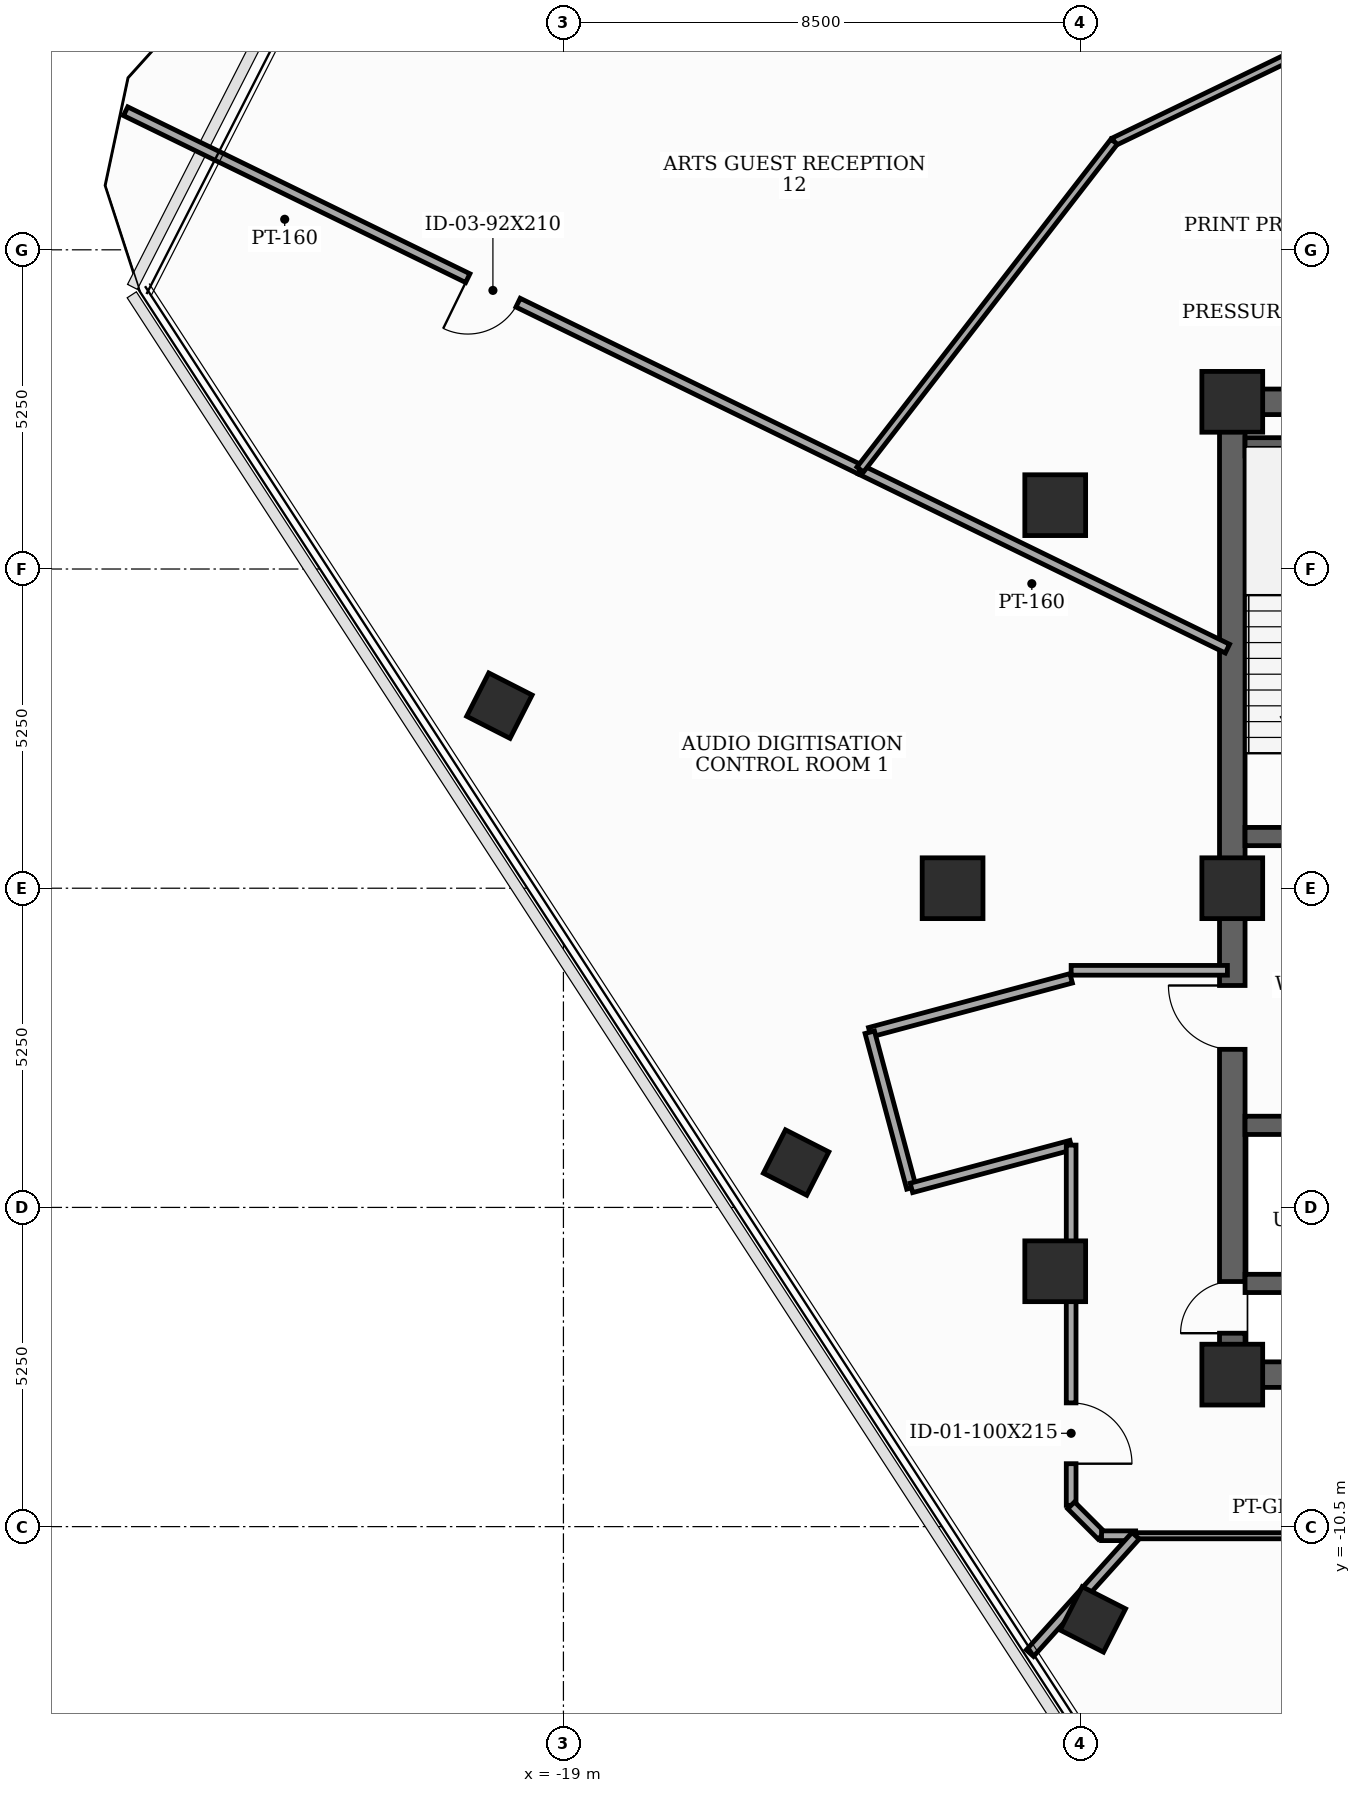
"""IFC4 building model, lengths in metres.
Left out: names, types, materials, properties, quantities, classifications, styles, units other than length and angle.
Written with IfcOpenShell. Run it as: python <this file> out.ifc"""

import sys

from ifc_helpers import new_model, si_unit, direction, frame, frame_2d, origin, origin_2d, place, context, subcontext, project, spatial, rectangle, extrude, element, fill, save


model = new_model("IFC4")
c1 = context("Model", 3, precision=1e-05, world=origin(), true_north=direction((0.0, 1.0)))
c2 = subcontext(c1, "Body", "Model", "MODEL_VIEW")
j1 = project(units=[si_unit("LENGTHUNIT", "METRE"), si_unit("PLANEANGLEUNIT", "RADIAN")], contexts=[c1])
p1 = place(None, origin())
s1 = spatial("IfcSite", under=j1, at=p1, CompositionType="ELEMENT")
p2 = place(p1, origin())
s2 = spatial("IfcBuilding", under=s1, at=p2, CompositionType="ELEMENT")
p3 = place(p2, frame((0.0, 0.0, 255.9)))
s3 = spatial("IfcBuildingStorey", under=s2, at=p3, CompositionType="ELEMENT", Elevation=255.9)
for number, where, z_axis, x_axis in (
    (1, (-8.0, -8.0, 0.0), (0.0, 0.0, 1.0), (1.0, 0.0, 0.0)),
    (2, (-8.0, 8.0, 0.0), (0.0, 0.0, 1.0), (1.0, 0.0, 0.0)),
    (3, (-8.0, 0.0, 0.0), (0.0, 0.0, 1.0), (1.0, 0.0, 0.0)),
    (4, (-10.912, 6.3, 0.0), (0.0, 0.0, 1.0), (1.0, 0.0, 0.0)),
    (5, (-12.6, 0.0, 0.0), (0.0, 0.0, 1.0), (1.0, 0.0, 0.0)),
    (6, (-10.912, -6.3, 0.0), (0.0, 0.0, 1.0), (1.0, 0.0, 0.0)),
):
    element("IfcColumn", number, at=place(p3, frame(where, z_axis=z_axis, x_axis=x_axis)), inside=s3, PredefinedType="COLUMN", context=c2, shape_type="SweptSolid", body=[
        extrude(rectangle(XDim=1.0, YDim=1.0, at=origin_2d()), origin(), (0.0, 0.0, 1.0), 3.7),
    ])
for number, where, z_axis, x_axis in (
    (7, (-20.053, 3.003, 0.0), (0.0, 0.0, 1.0), (0.454, 0.891, 0.0)),
    (8, (-15.173, -4.512, 0.0), (0.0, 0.0, 1.0), (0.454, 0.891, 0.0)),
    (9, (-10.293, -12.026, 0.0), (0.0, 0.0, 1.0), (0.454, 0.891, 0.0)),
):
    element("IfcColumn", number, at=place(p3, frame(where, z_axis=z_axis, x_axis=x_axis)), inside=s3, PredefinedType="COLUMN", context=c2, shape_type="SweptSolid", body=[
        extrude(rectangle(XDim=0.8, YDim=0.8, at=origin_2d()), origin(), (0.0, 0.0, 1.0), 3.7),
    ])
p4 = place(p3, frame((-8.0, -8.0, 0.0), z_axis=(0.0, 0.0, 1.0), x_axis=(0.0, 1.0, 0.0)))
e10 = element("IfcWall", 10, at=p4, inside=s3, PredefinedType="SHEAR", context=c2, shape_type="SweptSolid", body=[
    extrude(rectangle(XDim=16.0, YDim=0.42, at=frame_2d((8.0, 0.0))), origin(), (0.0, 0.0, 1.0), 3.5),
])
p5 = place(p4, frame((0.681, 0.0, 0.0)))
e11 = element("IfcOpeningElement", 11, at=p5, cuts=e10, PredefinedType="OPENING", context=c2, shape_type="SweptSolid", body=[
    extrude(rectangle(XDim=0.85, YDim=2.02, at=frame_2d((0.425, 1.01))), frame((0.0, 0.22, 0.0), z_axis=(0.0, -1.0, 0.0), x_axis=(1.0, 0.0, 0.0)), (0.0, 0.0, 1.0), 0.44),
])
p6 = place(p4, frame((5.35, 0.0, 0.0)))
e12 = element("IfcOpeningElement", 12, at=p6, cuts=e10, PredefinedType="OPENING", context=c2, shape_type="SweptSolid", body=[
    extrude(rectangle(XDim=1.05, YDim=2.15, at=frame_2d((0.525, 1.075))), frame((0.0, 0.22, 0.0), z_axis=(0.0, -1.0, 0.0), x_axis=(1.0, 0.0, 0.0)), (0.0, 0.0, 1.0), 0.44),
])
p7 = place(p3, frame((-8.0, -8.0, 0.0), z_axis=(0.0, 0.0, 1.0), x_axis=(1.0, 0.0, 0.0)))
e13 = element("IfcWall", 13, at=p7, inside=s3, PredefinedType="SHEAR", context=c2, shape_type="SweptSolid", body=[
    extrude(rectangle(XDim=16.0, YDim=0.42, at=frame_2d((8.0, 0.0))), origin(), (0.0, 0.0, 1.0), 3.5),
])
p8 = place(p7, frame((5.2, 0.0, 0.0)))
e14 = element("IfcOpeningElement", 14, at=p8, cuts=e13, PredefinedType="OPENING", context=c2, shape_type="SweptSolid", body=[
    extrude(rectangle(XDim=0.95, YDim=2.1, at=frame_2d((0.475, 1.05))), frame((0.0, 0.22, 0.0), z_axis=(0.0, -1.0, 0.0), x_axis=(1.0, 0.0, 0.0)), (0.0, 0.0, 1.0), 0.44),
])
p9 = place(p7, frame((9.8, 0.0, 0.0)))
e15 = element("IfcOpeningElement", 15, at=p9, cuts=e13, PredefinedType="OPENING", context=c2, shape_type="SweptSolid", body=[
    extrude(rectangle(XDim=0.95, YDim=2.1, at=frame_2d((0.475, 1.05))), frame((0.0, 0.22, 0.0), z_axis=(0.0, -1.0, 0.0), x_axis=(1.0, 0.0, 0.0)), (0.0, 0.0, 1.0), 0.44),
])
p10 = place(p3, frame((-8.0, 8.0, 0.0), z_axis=(0.0, 0.0, 1.0), x_axis=(1.0, 0.0, 0.0)))
e16 = element("IfcWall", 16, at=p10, inside=s3, PredefinedType="SHEAR", context=c2, shape_type="SweptSolid", body=[
    extrude(rectangle(XDim=16.0, YDim=0.42, at=frame_2d((8.0, 0.0))), origin(), (0.0, 0.0, 1.0), 3.5),
])
p11 = place(p10, frame((7.1, 0.0, 0.0)))
e17 = element("IfcOpeningElement", 17, at=p11, cuts=e16, PredefinedType="OPENING", context=c2, shape_type="SweptSolid", body=[
    extrude(rectangle(XDim=1.8, YDim=2.15, at=frame_2d((0.9, 1.075))), frame((0.0, 0.22, 0.0), z_axis=(0.0, -1.0, 0.0), x_axis=(1.0, 0.0, 0.0)), (0.0, 0.0, 1.0), 0.44),
])
p12 = place(p3, frame((-7.79, 0.85, 0.0), z_axis=(0.0, 0.0, 1.0), x_axis=(1.0, 0.0, 0.0)))
e18 = element("IfcWall", 18, at=p12, inside=s3, PredefinedType="SHEAR", context=c2, shape_type="SweptSolid", body=[
    extrude(rectangle(XDim=3.34, YDim=0.3, at=frame_2d((1.67, 0.0))), origin(), (0.0, 0.0, 1.0), 3.5),
])
p13 = place(p12, frame((1.85, 0.0, 0.0)))
e19 = element("IfcOpeningElement", 19, at=p13, cuts=e18, PredefinedType="OPENING", context=c2, shape_type="SweptSolid", body=[
    extrude(rectangle(XDim=1.05, YDim=2.15, at=frame_2d((0.525, 1.075))), frame((0.0, 0.16, 0.0), z_axis=(0.0, -1.0, 0.0), x_axis=(1.0, 0.0, 0.0)), (0.0, 0.0, 1.0), 0.32),
])
p14 = place(p3, frame((-7.79, 7.26, 0.0), z_axis=(0.0, 0.0, 1.0), x_axis=(1.0, 0.0, 0.0)))
e20 = element("IfcWall", 20, at=p14, inside=s3, PredefinedType="SHEAR", context=c2, shape_type="SweptSolid", body=[
    extrude(rectangle(XDim=3.34, YDim=0.3, at=frame_2d((1.67, 0.0))), origin(), (0.0, 0.0, 1.0), 3.5),
])
p15 = place(p3, frame((-7.79, -3.9, 0.0), z_axis=(0.0, 0.0, 1.0), x_axis=(1.0, 0.0, 0.0)))
e21 = element("IfcWall", 21, at=p15, inside=s3, PredefinedType="SHEAR", context=c2, shape_type="SweptSolid", body=[
    extrude(rectangle(XDim=3.34, YDim=0.3, at=frame_2d((1.67, 0.0))), origin(), (0.0, 0.0, 1.0), 3.5),
])
p16 = place(p15, frame((1.27, 0.0, 0.0)))
e22 = element("IfcOpeningElement", 22, at=p16, cuts=e21, PredefinedType="OPENING", context=c2, shape_type="SweptSolid", body=[
    extrude(rectangle(XDim=1.1, YDim=2.1, at=frame_2d((0.55, 1.05))), frame((0.0, 0.16, 0.0), z_axis=(0.0, -1.0, 0.0), x_axis=(1.0, 0.0, 0.0)), (0.0, 0.0, 1.0), 0.32),
])
p17 = place(p3, frame((-7.79, -6.5, 0.0), z_axis=(0.0, 0.0, 1.0), x_axis=(1.0, 0.0, 0.0)))
e23 = element("IfcWall", 23, at=p17, inside=s3, PredefinedType="SHEAR", context=c2, shape_type="SweptSolid", body=[
    extrude(rectangle(XDim=3.34, YDim=0.3, at=frame_2d((1.67, 0.0))), origin(), (0.0, 0.0, 1.0), 3.5),
])
p18 = place(p3, frame((-8.08, -1.35, 0.0), z_axis=(0.0, 0.0, 1.0), x_axis=(-1.0, 0.0, 0.0)))
e24 = element("IfcWall", 24, at=p18, inside=s3, PredefinedType="PARTITIONING", context=c2, shape_type="SweptSolid", body=[
    extrude(rectangle(XDim=2.57, YDim=0.16, at=frame_2d((1.285, 0.0))), origin(), (0.0, 0.0, 1.0), 2.885),
])
p19 = place(p3, frame((-10.65, -1.482, 0.0), z_axis=(0.0, 0.0, 1.0), x_axis=(-0.965961397105, -0.2586862565, 0.0)))
e25 = element("IfcWall", 25, at=p19, inside=s3, PredefinedType="PARTITIONING", context=c2, shape_type="SweptSolid", body=[
    extrude(rectangle(XDim=3.429, YDim=0.16, at=frame_2d((1.714, 0.0))), origin(), (0.0, 0.0, 1.0), 2.885),
])
p20 = place(p3, frame((-13.962, -2.369, 0.0), z_axis=(0.0, 0.0, 1.0), x_axis=(0.258413725385, -0.966034340245, 0.0)))
e26 = element("IfcWall", 26, at=p20, inside=s3, PredefinedType="PARTITIONING", context=c2, shape_type="SweptSolid", body=[
    extrude(rectangle(XDim=2.65, YDim=0.16, at=frame_2d((1.325, 0.0))), origin(), (0.0, 0.0, 1.0), 3.5),
])
p21 = place(p3, frame((-13.277, -4.929, 0.0), z_axis=(0.0, 0.0, 1.0), x_axis=(0.965934830229, 0.258785439601, 0.0)))
e27 = element("IfcWall", 27, at=p21, inside=s3, PredefinedType="PARTITIONING", context=c2, shape_type="SweptSolid", body=[
    extrude(rectangle(XDim=2.72, YDim=0.16, at=frame_2d((1.36, 0.0))), origin(), (0.0, 0.0, 1.0), 2.885),
])
p22 = place(p3, frame((-10.65, -4.225, 0.0), z_axis=(0.0, 0.0, 1.0), x_axis=(0.0, -1.0, 0.0)))
e28 = element("IfcWall", 28, at=p22, inside=s3, PredefinedType="PARTITIONING", context=c2, shape_type="SweptSolid", body=[
    extrude(rectangle(XDim=5.925, YDim=0.16, at=frame_2d((2.962, 0.0))), origin(), (0.0, 0.0, 1.0), 2.885),
])
p23 = place(p22, frame((4.24, 0.0, 0.0)))
e29 = element("IfcOpeningElement", 29, at=p23, cuts=e28, PredefinedType="OPENING", context=c2, shape_type="SweptSolid", body=[
    extrude(rectangle(XDim=1.0, YDim=2.15, at=frame_2d((0.5, 1.075))), frame((0.0, 0.09, 0.0), z_axis=(0.0, -1.0, 0.0), x_axis=(1.0, 0.0, 0.0)), (0.0, 0.0, 1.0), 0.18),
])
p24 = place(p3, frame((-10.65, -10.15, 0.0), z_axis=(0.0, 0.0, 1.0), x_axis=(0.707106781187, -0.707106781187, 0.0)))
e30 = element("IfcWall", 30, at=p24, inside=s3, PredefinedType="PARTITIONING", context=c2, shape_type="SweptSolid", body=[
    extrude(rectangle(XDim=0.707, YDim=0.16, at=frame_2d((0.354, 0.0))), origin(), (0.0, 0.0, 1.0), 3.5),
])
p25 = place(p3, frame((-10.15, -10.65, 0.0), z_axis=(0.0, 0.0, 1.0), x_axis=(1.0, 0.0, 0.0)))
e31 = element("IfcWall", 31, at=p25, inside=s3, PredefinedType="PARTITIONING", context=c2, shape_type="SweptSolid", body=[
    extrude(rectangle(XDim=0.561, YDim=0.16, at=frame_2d((0.28, 0.0))), origin(), (0.0, 0.0, 1.0), 3.5),
])
p26 = place(p3, frame((-9.589, -10.65, 0.0), z_axis=(0.0, 0.0, 1.0), x_axis=(1.0, 0.0, 0.0)))
e32 = element("IfcWall", 32, at=p26, inside=s3, PredefinedType="MOVABLE", context=c2, shape_type="SweptSolid", body=[
    extrude(rectangle(XDim=4.739, YDim=0.1, at=frame_2d((2.37, 0.0))), origin(), (0.0, 0.0, 1.0), 2.885),
])
p27 = place(p3, frame((-11.328, -12.581, 0.0), z_axis=(0.0, 0.0, 1.0), x_axis=(0.669120437161, 0.743153981739, 0.0)))
e33 = element("IfcWall", 33, at=p27, inside=s3, PredefinedType="PARTITIONING", context=c2, shape_type="SweptSolid", body=[
    extrude(rectangle(XDim=2.599, YDim=0.16, at=frame_2d((1.299, 0.0))), origin(), (0.0, 0.0, 1.0), 3.035),
])
p28 = place(p3, frame((-8.08, 3.941, 0.0), z_axis=(0.0, 0.0, 1.0), x_axis=(-0.898794985177, 0.438369221798, 0.0)))
e34 = element("IfcWall", 34, at=p28, inside=s3, PredefinedType="PARTITIONING", context=c2, shape_type="SweptSolid", body=[
    extrude(rectangle(XDim=6.719, YDim=0.16, at=frame_2d((3.359, 0.0))), origin(), (0.0, 0.0, 1.0), 2.885),
])
p29 = place(p3, frame((-14.119, 6.886, 0.0), z_axis=(0.0, 0.0, 1.0), x_axis=(-0.898768620199, 0.438423274184, 0.0)))
e35 = element("IfcWall", 35, at=p29, inside=s3, PredefinedType="PARTITIONING", context=c2, shape_type="SweptSolid", body=[
    extrude(rectangle(XDim=13.442, YDim=0.16, at=frame_2d((6.721, 0.0))), origin(), (0.0, 0.0, 1.0), 3.035),
])
p30 = place(p29, frame((6.261, 0.0, 0.0)))
e36 = element("IfcOpeningElement", 36, at=p30, cuts=e35, PredefinedType="OPENING", context=c2, shape_type="SweptSolid", body=[
    extrude(rectangle(XDim=0.92, YDim=2.1, at=frame_2d((0.46, 1.05))), frame((0.0, 0.09, 0.0), z_axis=(0.0, -1.0, 0.0), x_axis=(1.0, 0.0, 0.0)), (0.0, 0.0, 1.0), 0.18),
])
p31 = place(p3, frame((-3.8, 15.242, 0.0), z_axis=(0.0, 0.0, 1.0), x_axis=(-0.900708156853, -0.434424695635, 0.0)))
e37 = element("IfcWall", 37, at=p31, inside=s3, PredefinedType="PARTITIONING", context=c2, shape_type="SweptSolid", body=[
    extrude(rectangle(XDim=6.82, YDim=0.135, at=frame_2d((3.41, 0.0))), origin(), (0.0, 0.0, 1.0), 3.035),
])
p32 = place(p3, frame((-9.943, 12.279, 0.0), z_axis=(0.0, 0.0, 1.0), x_axis=(-0.612219395693, -0.790687935621, 0.0)))
e38 = element("IfcWall", 38, at=p32, inside=s3, PredefinedType="PARTITIONING", context=c2, shape_type="SweptSolid", body=[
    extrude(rectangle(XDim=6.821, YDim=0.135, at=frame_2d((3.41, 0.0))), origin(), (0.0, 0.0, 1.0), 3.185),
])
p33 = place(p5, origin())
e39 = element("IfcDoor", 39, at=p33, inside=s3, OperationType="SINGLE_SWING_LEFT", PredefinedType="TRAPDOOR", context=c2, shape_type="SweptSolid", body=[
    extrude(rectangle(XDim=0.85, YDim=2.02, at=frame_2d((0.425, 1.01))), frame((0.0, 0.025, 0.0), z_axis=(0.0, -1.0, 0.0), x_axis=(1.0, 0.0, 0.0)), (0.0, 0.0, 1.0), 0.05),
])
fill(e11, e39)
p34 = place(p6, origin())
e40 = element("IfcDoor", 40, at=p34, inside=s3, OperationType="SINGLE_SWING_RIGHT", PredefinedType="DOOR", context=c2, shape_type="SweptSolid", body=[
    extrude(rectangle(XDim=1.05, YDim=2.15, at=frame_2d((0.525, 1.075))), frame((0.0, 0.025, 0.0), z_axis=(0.0, -1.0, 0.0), x_axis=(1.0, 0.0, 0.0)), (0.0, 0.0, 1.0), 0.05),
])
fill(e12, e40)
p35 = place(p23, origin())
e41 = element("IfcDoor", 41, at=p35, inside=s3, OperationType="SINGLE_SWING_RIGHT", PredefinedType="DOOR", context=c2, shape_type="SweptSolid", body=[
    extrude(rectangle(XDim=1.0, YDim=2.15, at=frame_2d((0.5, 1.075))), frame((0.0, 0.025, 0.0), z_axis=(0.0, -1.0, 0.0), x_axis=(1.0, 0.0, 0.0)), (0.0, 0.0, 1.0), 0.05),
])
fill(e29, e41)
p36 = place(p30, origin())
e42 = element("IfcDoor", 42, at=p36, inside=s3, OperationType="SINGLE_SWING_RIGHT", PredefinedType="DOOR", context=c2, shape_type="SweptSolid", body=[
    extrude(rectangle(XDim=0.92, YDim=2.1, at=frame_2d((0.46, 1.05))), frame((0.0, 0.025, 0.0), z_axis=(0.0, -1.0, 0.0), x_axis=(1.0, 0.0, 0.0)), (0.0, 0.0, 1.0), 0.05),
])
fill(e36, e42)
save(model, sys.argv[1])
